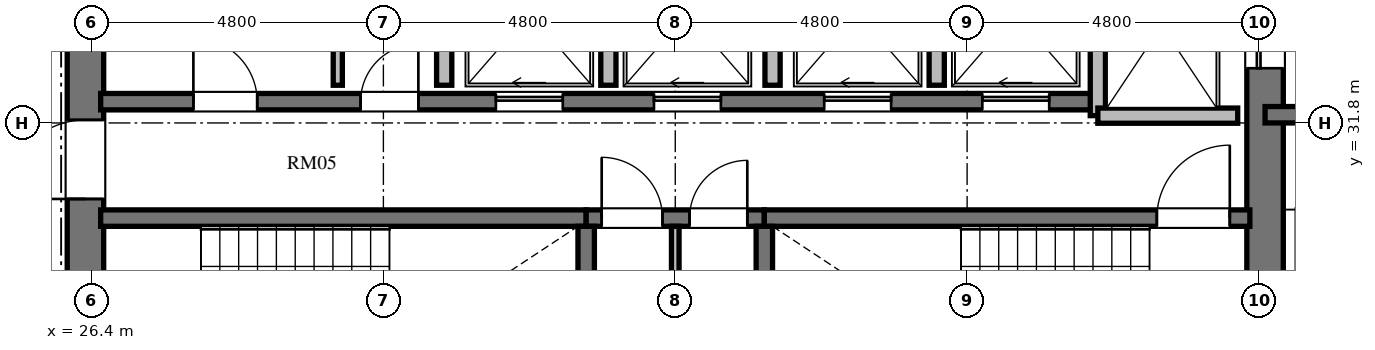
"""IFC4 building model, lengths in metres.
Left out: names, types, materials, properties, quantities, classifications, styles, units other than length and angle.
Written with IfcOpenShell. Run it as: python <this file> out.ifc"""

import sys

from ifc_helpers import new_model, si_unit, direction, frame, frame_2d, origin, place, context, subcontext, project, spatial, rectangle, extrude, element, fill, save


model = new_model("IFC4")
c1 = context("Model", 3, precision=1e-05, world=origin(), true_north=direction((0.0, 1.0)))
c2 = subcontext(c1, "Body", "Model", "MODEL_VIEW")
j1 = project(units=[si_unit("LENGTHUNIT", "METRE"), si_unit("PLANEANGLEUNIT", "RADIAN")], contexts=[c1])
p1 = place(None, origin())
s1 = spatial("IfcSite", under=j1, at=p1, CompositionType="ELEMENT")
p2 = place(p1, origin())
s2 = spatial("IfcBuilding", under=s1, at=p2, CompositionType="ELEMENT")
p3 = place(p2, frame((0.0, 0.0, 160.176)))
s3 = spatial("IfcBuildingStorey", under=s2, at=p3, CompositionType="ELEMENT", Elevation=160.176)
p4 = place(p3, frame((26.3, 20.95, 0.0), z_axis=(0.0, 0.0, 1.0), x_axis=(0.0, 1.0, 0.0)))
e1 = element("IfcWall", 1, at=p4, inside=s3, PredefinedType="SHEAR", context=c2, shape_type="SweptSolid", body=[
    extrude(rectangle(XDim=14.1, YDim=0.6, at=frame_2d((7.05, 0.0))), origin(), (0.0, 0.0, 1.0), 3.648),
])
p5 = place(p4, frame((6.5, 0.0, 0.0)))
e2 = element("IfcOpeningElement", 2, at=p5, cuts=e1, PredefinedType="OPENING", context=c2, shape_type="SweptSolid", body=[
    extrude(rectangle(XDim=1.2, YDim=2.15, at=frame_2d((0.6, 1.075))), frame((0.0, 0.31, 0.0), z_axis=(0.0, -1.0, 0.0), x_axis=(1.0, 0.0, 0.0)), (0.0, 0.0, 1.0), 0.62),
])
p6 = place(p4, frame((9.6, 0.0, 0.0)))
e3 = element("IfcOpeningElement", 3, at=p6, cuts=e1, PredefinedType="OPENING", context=c2, shape_type="SweptSolid", body=[
    extrude(rectangle(XDim=1.3, YDim=2.2, at=frame_2d((0.65, 1.1))), frame((0.0, 0.31, 0.0), z_axis=(0.0, -1.0, 0.0), x_axis=(1.0, 0.0, 0.0)), (0.0, 0.0, 1.0), 0.62),
])
p7 = place(p4, frame((3.26, 0.0, 0.0)))
e4 = element("IfcOpeningElement", 4, at=p7, cuts=e1, PredefinedType="OPENING", context=c2, shape_type="SweptSolid", body=[
    extrude(rectangle(XDim=1.3, YDim=2.2, at=frame_2d((0.65, 1.1))), frame((0.0, 0.31, 0.0), z_axis=(0.0, -1.0, 0.0), x_axis=(1.0, 0.0, 0.0)), (0.0, 0.0, 1.0), 0.62),
])
p8 = place(p3, frame((45.7, 20.95, 0.0), z_axis=(0.0, 0.0, 1.0), x_axis=(0.0, 1.0, 0.0)))
e5 = element("IfcWall", 5, at=p8, inside=s3, PredefinedType="SHEAR", context=c2, shape_type="SweptSolid", body=[
    extrude(rectangle(XDim=14.1, YDim=0.6, at=frame_2d((7.05, 0.0))), origin(), (0.0, 0.0, 1.0), 3.648),
])
p9 = place(p8, frame((11.75, 0.0, 0.0)))
e6 = element("IfcOpeningElement", 6, at=p9, cuts=e5, PredefinedType="OPENING", context=c2, shape_type="SweptSolid", body=[
    extrude(rectangle(XDim=1.4, YDim=2.3, at=frame_2d((0.7, 1.15))), frame((0.0, 0.31, 0.0), z_axis=(0.0, -1.0, 0.0), x_axis=(1.0, 0.0, 0.0)), (0.0, 0.0, 1.0), 0.62),
])
p10 = place(p8, frame((0.95, 0.0, 0.0)))
e7 = element("IfcOpeningElement", 7, at=p10, cuts=e5, PredefinedType="OPENING", context=c2, shape_type="SweptSolid", body=[
    extrude(rectangle(XDim=1.4, YDim=2.3, at=frame_2d((0.7, 1.15))), frame((0.0, 0.31, 0.0), z_axis=(0.0, -1.0, 0.0), x_axis=(1.0, 0.0, 0.0)), (0.0, 0.0, 1.0), 0.62),
])
p11 = place(p3, frame((26.55, 30.235, 0.0), z_axis=(0.0, 0.0, 1.0), x_axis=(1.0, 0.0, 0.0)))
e8 = element("IfcWall", 8, at=p11, inside=s3, PredefinedType="SHEAR", context=c2, shape_type="SweptSolid", body=[
    extrude(rectangle(XDim=7.985, YDim=0.27, at=frame_2d((3.992, 0.0))), origin(), (0.0, 0.0, 1.0), 3.648),
])
p12 = place(p3, frame((34.535, 30.235, 0.0), z_axis=(0.0, 0.0, 1.0), x_axis=(1.0, 0.0, 0.0)))
e9 = element("IfcWall", 9, at=p12, inside=s3, PredefinedType="SHEAR", context=c2, shape_type="SweptSolid", body=[
    extrude(rectangle(XDim=2.93, YDim=0.27, at=frame_2d((1.465, 0.0))), origin(), (0.0, 0.0, 1.0), 3.648),
])
p13 = place(p12, frame((0.255, 0.0, 0.0)))
e10 = element("IfcOpeningElement", 10, at=p13, cuts=e9, PredefinedType="OPENING", context=c2, shape_type="SweptSolid", body=[
    extrude(rectangle(XDim=1.0, YDim=2.1, at=frame_2d((0.5, 1.05))), frame((0.0, 0.145, 0.0), z_axis=(0.0, -1.0, 0.0), x_axis=(1.0, 0.0, 0.0)), (0.0, 0.0, 1.0), 0.29),
])
p14 = place(p12, frame((1.7, 0.0, 0.0)))
e11 = element("IfcOpeningElement", 11, at=p14, cuts=e9, PredefinedType="OPENING", context=c2, shape_type="SweptSolid", body=[
    extrude(rectangle(XDim=0.95, YDim=2.1, at=frame_2d((0.475, 1.05))), frame((0.0, 0.145, 0.0), z_axis=(0.0, -1.0, 0.0), x_axis=(1.0, 0.0, 0.0)), (0.0, 0.0, 1.0), 0.29),
])
p15 = place(p3, frame((37.465, 30.235, 0.0), z_axis=(0.0, 0.0, 1.0), x_axis=(1.0, 0.0, 0.0)))
e12 = element("IfcWall", 12, at=p15, inside=s3, PredefinedType="SHEAR", context=c2, shape_type="SweptSolid", body=[
    extrude(rectangle(XDim=7.985, YDim=0.27, at=frame_2d((3.992, 0.0))), origin(), (0.0, 0.0, 1.0), 3.648),
])
p16 = place(p15, frame((6.455, 0.0, 0.0)))
e13 = element("IfcOpeningElement", 13, at=p16, cuts=e12, PredefinedType="OPENING", context=c2, shape_type="SweptSolid", body=[
    extrude(rectangle(XDim=1.2, YDim=2.15, at=frame_2d((0.6, 1.075))), frame((0.0, 0.145, 0.0), z_axis=(0.0, -1.0, 0.0), x_axis=(1.0, 0.0, 0.0)), (0.0, 0.0, 1.0), 0.29),
])
for number, where, z_axis, x_axis in (
    (14, (34.535, 26.02, 0.0), (0.0, 0.0, 1.0), (0.0, 1.0, 0.0)),
    (15, (37.465, 26.02, 0.0), (0.0, 0.0, 1.0), (0.0, 1.0, 0.0)),
):
    element("IfcWall", number, at=place(p3, frame(where, z_axis=z_axis, x_axis=x_axis)), inside=s3, PredefinedType="SHEAR", context=c2, shape_type="SweptSolid", body=[
        extrude(rectangle(XDim=4.08, YDim=0.27, at=frame_2d((2.04, 0.0))), origin(), (0.0, 0.0, 1.0), 3.648),
    ])
p17 = place(p3, frame((36.0, 26.02, 0.0), z_axis=(0.0, 0.0, 1.0), x_axis=(0.0, 1.0, 0.0)))
e16 = element("IfcWall", 16, at=p17, inside=s3, PredefinedType="PARTITIONING", context=c2, shape_type="SweptSolid", body=[
    extrude(rectangle(XDim=4.08, YDim=0.125, at=frame_2d((2.04, 0.0))), origin(), (0.0, 0.0, 1.0), 3.428),
])
p18 = place(p3, frame((26.55, 32.15, 0.0), z_axis=(0.0, 0.0, 1.0), x_axis=(1.0, 0.0, 0.0)))
e17 = element("IfcWall", 17, at=p18, inside=s3, PredefinedType="SHEAR", context=c2, shape_type="SweptSolid", body=[
    extrude(rectangle(XDim=16.4, YDim=0.27, at=frame_2d((8.2, 0.0))), origin(), (0.0, 0.0, 1.0), 3.648),
])
p19 = place(p18, frame((1.525, 0.0, 0.0)))
e18 = element("IfcOpeningElement", 18, at=p19, cuts=e17, PredefinedType="OPENING", context=c2, shape_type="SweptSolid", body=[
    extrude(rectangle(XDim=1.05, YDim=2.15, at=frame_2d((0.525, 1.075))), frame((0.0, 0.145, 0.0), z_axis=(0.0, -1.0, 0.0), x_axis=(1.0, 0.0, 0.0)), (0.0, 0.0, 1.0), 0.29),
])
p20 = place(p18, frame((4.275, 0.0, 0.0)))
e19 = element("IfcOpeningElement", 19, at=p20, cuts=e17, PredefinedType="OPENING", context=c2, shape_type="SweptSolid", body=[
    extrude(rectangle(XDim=0.95, YDim=2.1, at=frame_2d((0.475, 1.05))), frame((0.0, 0.145, 0.0), z_axis=(0.0, -1.0, 0.0), x_axis=(1.0, 0.0, 0.0)), (0.0, 0.0, 1.0), 0.29),
])
p21 = place(p18, frame((6.5, 0.0, 0.0)))
e20 = element("IfcOpeningElement", 20, at=p21, cuts=e17, PredefinedType="OPENING", context=c2, shape_type="SweptSolid", body=[
    extrude(rectangle(XDim=1.1, YDim=2.2, at=frame_2d((0.55, 1.1))), frame((0.0, 0.145, 0.0), z_axis=(0.0, -1.0, 0.0), x_axis=(1.0, 0.0, 0.0)), (0.0, 0.0, 1.0), 0.29),
])
p22 = place(p18, frame((9.1, 0.0, 0.0)))
e21 = element("IfcOpeningElement", 21, at=p22, cuts=e17, PredefinedType="OPENING", context=c2, shape_type="SweptSolid", body=[
    extrude(rectangle(XDim=1.1, YDim=2.2, at=frame_2d((0.55, 1.1))), frame((0.0, 0.145, 0.0), z_axis=(0.0, -1.0, 0.0), x_axis=(1.0, 0.0, 0.0)), (0.0, 0.0, 1.0), 0.29),
])
p23 = place(p18, frame((11.9, 0.0, 0.0)))
e22 = element("IfcOpeningElement", 22, at=p23, cuts=e17, PredefinedType="OPENING", context=c2, shape_type="SweptSolid", body=[
    extrude(rectangle(XDim=1.1, YDim=2.2, at=frame_2d((0.55, 1.1))), frame((0.0, 0.145, 0.0), z_axis=(0.0, -1.0, 0.0), x_axis=(1.0, 0.0, 0.0)), (0.0, 0.0, 1.0), 0.29),
])
p24 = place(p18, frame((14.5, 0.0, 0.0)))
e23 = element("IfcOpeningElement", 23, at=p24, cuts=e17, PredefinedType="OPENING", context=c2, shape_type="SweptSolid", body=[
    extrude(rectangle(XDim=1.1, YDim=2.2, at=frame_2d((0.55, 1.1))), frame((0.0, 0.145, 0.0), z_axis=(0.0, -1.0, 0.0), x_axis=(1.0, 0.0, 0.0)), (0.0, 0.0, 1.0), 0.29),
])
p25 = place(p3, frame((42.95, 31.92, 0.0), z_axis=(0.0, 0.0, 1.0), x_axis=(0.0, 1.0, 0.0)))
e24 = element("IfcWall", 24, at=p25, inside=s3, PredefinedType="SOLIDWALL", context=c2, shape_type="SweptSolid", body=[
    extrude(rectangle(XDim=3.18, YDim=0.25, at=frame_2d((1.59, 0.0))), origin(), (0.0, 0.0, 1.0), 3.428),
])
p26 = place(p3, frame((42.95, 31.92, 0.0), z_axis=(0.0, 0.0, 1.0), x_axis=(1.0, 0.0, 0.0)))
e25 = element("IfcWall", 25, at=p26, inside=s3, PredefinedType="SOLIDWALL", context=c2, shape_type="SweptSolid", body=[
    extrude(rectangle(XDim=2.3, YDim=0.25, at=frame_2d((1.15, 0.0))), origin(), (0.0, 0.0, 1.0), 3.428),
])
for number, where, z_axis, x_axis in (
    (26, (32.2, 32.42, 0.0), (0.0, 0.0, 1.0), (0.0, 1.0, 0.0)),
    (27, (34.9, 32.42, 0.0), (0.0, 0.0, 1.0), (0.0, 1.0, 0.0)),
    (28, (37.6, 32.42, 0.0), (0.0, 0.0, 1.0), (0.0, 1.0, 0.0)),
    (29, (40.3, 32.42, 0.0), (0.0, 0.0, 1.0), (0.0, 1.0, 0.0)),
):
    element("IfcWall", number, at=place(p3, frame(where, z_axis=z_axis, x_axis=x_axis)), inside=s3, PredefinedType="SOLIDWALL", context=c2, shape_type="SweptSolid", body=[
        extrude(rectangle(XDim=2.68, YDim=0.25, at=frame_2d((1.34, 0.0))), origin(), (0.0, 0.0, 1.0), 3.428),
    ])
p27 = place(p3, frame((30.45, 32.42, 0.0), z_axis=(0.0, 0.0, 1.0), x_axis=(0.0, 1.0, 0.0)))
e30 = element("IfcWall", 30, at=p27, inside=s3, PredefinedType="PARTITIONING", context=c2, shape_type="SweptSolid", body=[
    extrude(rectangle(XDim=2.68, YDim=0.15, at=frame_2d((1.34, 0.0))), origin(), (0.0, 0.0, 1.0), 3.428),
])
p28 = place(p3, frame((45.7, 31.935, 0.0), z_axis=(0.0, 0.0, 1.0), x_axis=(1.0, 0.0, 0.0)))
e31 = element("IfcWall", 31, at=p28, inside=s3, PredefinedType="SHEAR", context=c2, shape_type="SweptSolid", body=[
    extrude(rectangle(XDim=4.715, YDim=0.27, at=frame_2d((2.357, 0.0))), origin(), (0.0, 0.0, 1.0), 3.648),
])
p29 = place(p16, origin())
e32 = element("IfcDoor", 32, at=p29, inside=s3, OperationType="SINGLE_SWING_RIGHT", PredefinedType="DOOR", context=c2, shape_type="SweptSolid", body=[
    extrude(rectangle(XDim=1.2, YDim=2.15, at=frame_2d((0.6, 1.075))), frame((0.0, 0.025, 0.0), z_axis=(0.0, -1.0, 0.0), x_axis=(1.0, 0.0, 0.0)), (0.0, 0.0, 1.0), 0.05),
])
fill(e13, e32)
p30 = place(p13, origin())
e33 = element("IfcDoor", 33, at=p30, inside=s3, OperationType="SINGLE_SWING_LEFT", PredefinedType="DOOR", context=c2, shape_type="SweptSolid", body=[
    extrude(rectangle(XDim=1.0, YDim=2.1, at=frame_2d((0.5, 1.05))), frame((0.0, 0.025, 0.0), z_axis=(0.0, -1.0, 0.0), x_axis=(1.0, 0.0, 0.0)), (0.0, 0.0, 1.0), 0.05),
])
fill(e10, e33)
p31 = place(p14, origin())
e34 = element("IfcDoor", 34, at=p31, inside=s3, OperationType="SINGLE_SWING_RIGHT", PredefinedType="DOOR", context=c2, shape_type="SweptSolid", body=[
    extrude(rectangle(XDim=0.95, YDim=2.1, at=frame_2d((0.475, 1.05))), frame((0.0, 0.025, 0.0), z_axis=(0.0, -1.0, 0.0), x_axis=(1.0, 0.0, 0.0)), (0.0, 0.0, 1.0), 0.05),
])
fill(e11, e34)
p32 = place(p6, origin())
e35 = element("IfcDoor", 35, at=p32, inside=s3, OperationType="SINGLE_SWING_LEFT", PredefinedType="DOOR", context=c2, shape_type="SweptSolid", body=[
    extrude(rectangle(XDim=1.3, YDim=2.2, at=frame_2d((0.65, 1.1))), frame((0.0, 0.025, 0.0), z_axis=(0.0, -1.0, 0.0), x_axis=(1.0, 0.0, 0.0)), (0.0, 0.0, 1.0), 0.05),
])
fill(e3, e35)
p33 = place(p19, origin())
e36 = element("IfcDoor", 36, at=p33, inside=s3, OperationType="SINGLE_SWING_LEFT", PredefinedType="DOOR", context=c2, shape_type="SweptSolid", body=[
    extrude(rectangle(XDim=1.05, YDim=2.15, at=frame_2d((0.525, 1.075))), frame((0.0, 0.025, 0.0), z_axis=(0.0, -1.0, 0.0), x_axis=(1.0, 0.0, 0.0)), (0.0, 0.0, 1.0), 0.05),
])
fill(e18, e36)
p34 = place(p20, origin())
e37 = element("IfcDoor", 37, at=p34, inside=s3, OperationType="SINGLE_SWING_RIGHT", PredefinedType="DOOR", context=c2, shape_type="SweptSolid", body=[
    extrude(rectangle(XDim=0.95, YDim=2.1, at=frame_2d((0.475, 1.05))), frame((0.0, 0.025, 0.0), z_axis=(0.0, -1.0, 0.0), x_axis=(1.0, 0.0, 0.0)), (0.0, 0.0, 1.0), 0.05),
])
fill(e19, e37)
p35 = place(p21, origin())
e38 = element("IfcDoor", 38, at=p35, inside=s3, OperationType="SLIDING_TO_LEFT", PredefinedType="DOOR", context=c2, shape_type="SweptSolid", body=[
    extrude(rectangle(XDim=1.1, YDim=2.2, at=frame_2d((0.55, 1.1))), frame((0.0, 0.025, 0.0), z_axis=(0.0, -1.0, 0.0), x_axis=(1.0, 0.0, 0.0)), (0.0, 0.0, 1.0), 0.05),
])
fill(e20, e38)
p36 = place(p22, origin())
e39 = element("IfcDoor", 39, at=p36, inside=s3, OperationType="SLIDING_TO_LEFT", PredefinedType="DOOR", context=c2, shape_type="SweptSolid", body=[
    extrude(rectangle(XDim=1.1, YDim=2.2, at=frame_2d((0.55, 1.1))), frame((0.0, 0.025, 0.0), z_axis=(0.0, -1.0, 0.0), x_axis=(1.0, 0.0, 0.0)), (0.0, 0.0, 1.0), 0.05),
])
fill(e21, e39)
p37 = place(p23, origin())
e40 = element("IfcDoor", 40, at=p37, inside=s3, OperationType="SLIDING_TO_LEFT", PredefinedType="DOOR", context=c2, shape_type="SweptSolid", body=[
    extrude(rectangle(XDim=1.1, YDim=2.2, at=frame_2d((0.55, 1.1))), frame((0.0, 0.025, 0.0), z_axis=(0.0, -1.0, 0.0), x_axis=(1.0, 0.0, 0.0)), (0.0, 0.0, 1.0), 0.05),
])
fill(e22, e40)
p38 = place(p24, origin())
e41 = element("IfcDoor", 41, at=p38, inside=s3, OperationType="SLIDING_TO_LEFT", PredefinedType="DOOR", context=c2, shape_type="SweptSolid", body=[
    extrude(rectangle(XDim=1.1, YDim=2.2, at=frame_2d((0.55, 1.1))), frame((0.0, 0.025, 0.0), z_axis=(0.0, -1.0, 0.0), x_axis=(1.0, 0.0, 0.0)), (0.0, 0.0, 1.0), 0.05),
])
fill(e23, e41)
p39 = place(p9, origin())
e42 = element("IfcDoor", 42, at=p39, inside=s3, OperationType="SLIDING_TO_LEFT", PredefinedType="DOOR", context=c2, shape_type="SweptSolid", body=[
    extrude(rectangle(XDim=1.4, YDim=2.3, at=frame_2d((0.7, 1.15))), frame((0.0, 0.025, 0.0), z_axis=(0.0, -1.0, 0.0), x_axis=(1.0, 0.0, 0.0)), (0.0, 0.0, 1.0), 0.05),
])
fill(e6, e42)
save(model, sys.argv[1])
